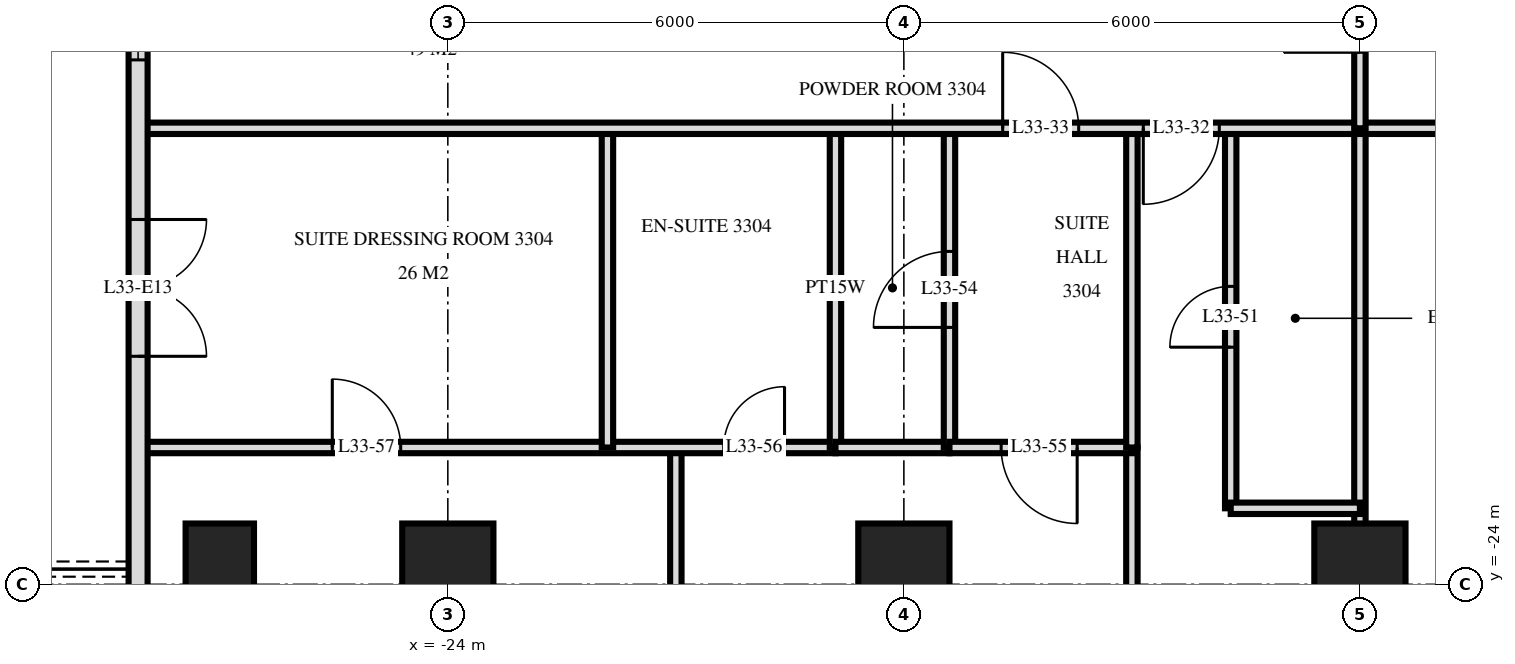
"""IFC4 building model, lengths in metres.
Left out: names, types, materials, properties, quantities, classifications, styles, units other than length and angle.
Written with IfcOpenShell. Run it as: python <this file> out.ifc"""

import sys

from ifc_helpers import new_model, si_unit, direction, frame, frame_2d, origin, origin_2d, place, context, subcontext, project, spatial, rectangle, extrude, element, fill, save


model = new_model("IFC4")
c1 = context("Model", 3, precision=1e-05, world=origin(), true_north=direction((0.0, 1.0)))
c2 = subcontext(c1, "Body", "Model", "MODEL_VIEW")
j1 = project(units=[si_unit("LENGTHUNIT", "METRE"), si_unit("PLANEANGLEUNIT", "RADIAN")], contexts=[c1])
p1 = place(None, origin())
s1 = spatial("IfcSite", under=j1, at=p1, CompositionType="ELEMENT")
p2 = place(p1, origin())
s2 = spatial("IfcBuilding", under=s1, at=p2, CompositionType="ELEMENT")
p3 = place(p2, frame((0.0, 0.0, 130.8)))
s3 = spatial("IfcBuildingStorey", under=s2, at=p3, CompositionType="ELEMENT", Elevation=130.8)
p4 = place(p3, frame((-27.0, -23.8, 0.0), z_axis=(0.0, 0.0, 1.0), x_axis=(0.0, 1.0, 0.0)))
e1 = element("IfcColumn", 1, at=p4, inside=s3, PredefinedType="COLUMN", context=c2, shape_type="SweptSolid", body=[
    extrude(rectangle(XDim=1.2, YDim=0.9, at=origin_2d()), origin(), (0.0, 0.0, 1.0), 3.6),
])
for number, where, z_axis, x_axis in (
    (2, (-24.0, -23.8, 0.0), (0.0, 0.0, 1.0), (1.0, 0.0, 0.0)),
    (3, (-18.0, -23.8, 0.0), (0.0, 0.0, 1.0), (1.0, 0.0, 0.0)),
    (4, (-12.0, -23.8, 0.0), (0.0, 0.0, 1.0), (1.0, 0.0, 0.0)),
):
    element("IfcColumn", number, at=place(p3, frame(where, z_axis=z_axis, x_axis=x_axis)), inside=s3, PredefinedType="COLUMN", context=c2, shape_type="SweptSolid", body=[
        extrude(rectangle(XDim=1.2, YDim=1.2, at=origin_2d()), origin(), (0.0, 0.0, 1.0), 3.6),
    ])
p5 = place(p3, frame((-28.075, -3.325, 0.0), z_axis=(0.0, 0.0, 1.0), x_axis=(0.0, -1.0, 0.0)))
e5 = element("IfcWall", 5, at=p5, inside=s3, PredefinedType="SOLIDWALL", context=c2, shape_type="SweptSolid", body=[
    extrude(rectangle(XDim=25.951, YDim=0.25, at=frame_2d((12.975, 0.0))), origin(), (0.0, 0.0, 1.0), 3.32),
])
p6 = place(p5, frame((6.575, 0.0, 0.0)))
e6 = element("IfcOpeningElement", 6, at=p6, cuts=e5, PredefinedType="OPENING", context=c2, shape_type="SweptSolid", body=[
    extrude(rectangle(XDim=1.8, YDim=2.4, at=frame_2d((0.9, 1.2))), frame((0.0, 0.135, 0.0), z_axis=(0.0, -1.0, 0.0), x_axis=(1.0, 0.0, 0.0)), (0.0, 0.0, 1.0), 0.27),
])
p7 = place(p5, frame((9.425, 0.0, 0.3)))
e7 = element("IfcOpeningElement", 7, at=p7, cuts=e5, PredefinedType="OPENING", context=c2, shape_type="SweptSolid", body=[
    extrude(rectangle(XDim=1.8, YDim=2.1, at=frame_2d((0.9, 1.05))), frame((0.0, 0.135, 0.0), z_axis=(0.0, -1.0, 0.0), x_axis=(1.0, 0.0, 0.0)), (0.0, 0.0, 1.0), 0.27),
])
p8 = place(p5, frame((12.575, 0.0, 0.3)))
e8 = element("IfcOpeningElement", 8, at=p8, cuts=e5, PredefinedType="OPENING", context=c2, shape_type="SweptSolid", body=[
    extrude(rectangle(XDim=1.2, YDim=2.1, at=frame_2d((0.6, 1.05))), frame((0.0, 0.135, 0.0), z_axis=(0.0, -1.0, 0.0), x_axis=(1.0, 0.0, 0.0)), (0.0, 0.0, 1.0), 0.27),
])
p9 = place(p5, frame((15.875, 0.0, 0.0)))
e9 = element("IfcOpeningElement", 9, at=p9, cuts=e5, PredefinedType="OPENING", context=c2, shape_type="SweptSolid", body=[
    extrude(rectangle(XDim=1.8, YDim=2.4, at=frame_2d((0.9, 1.2))), frame((0.0, 0.135, 0.0), z_axis=(0.0, -1.0, 0.0), x_axis=(1.0, 0.0, 0.0)), (0.0, 0.0, 1.0), 0.27),
])
p10 = place(p5, frame((21.075, 0.0, 0.0)))
e10 = element("IfcOpeningElement", 10, at=p10, cuts=e5, PredefinedType="OPENING", context=c2, shape_type="SweptSolid", body=[
    extrude(rectangle(XDim=1.8, YDim=2.4, at=frame_2d((0.9, 1.2))), frame((0.0, 0.135, 0.0), z_axis=(0.0, -1.0, 0.0), x_axis=(1.0, 0.0, 0.0)), (0.0, 0.0, 1.0), 0.27),
])
p11 = place(p5, frame((23.825, 0.0, 0.3)))
e11 = element("IfcOpeningElement", 11, at=p11, cuts=e5, PredefinedType="OPENING", context=c2, shape_type="SweptSolid", body=[
    extrude(rectangle(XDim=1.8, YDim=2.1, at=frame_2d((0.9, 1.05))), frame((0.0, 0.135, 0.0), z_axis=(0.0, -1.0, 0.0), x_axis=(1.0, 0.0, 0.0)), (0.0, 0.0, 1.0), 0.27),
])
p12 = place(p3, frame((-12.0, -18.0, 0.0), z_axis=(0.0, 0.0, 1.0), x_axis=(0.0, 1.0, 0.0)))
e12 = element("IfcWall", 12, at=p12, inside=s3, PredefinedType="PARTITIONING", context=c2, shape_type="SweptSolid", body=[
    extrude(rectangle(XDim=2.95, YDim=0.15, at=frame_2d((1.475, 0.0))), origin(), (0.0, 0.0, 1.0), 3.32),
])
p13 = place(p12, frame((1.0, 0.0, 0.0)))
e13 = element("IfcOpeningElement", 13, at=p13, cuts=e12, PredefinedType="OPENING", context=c2, shape_type="SweptSolid", body=[
    extrude(rectangle(XDim=1.0, YDim=2.1, at=frame_2d((0.5, 1.05))), frame((0.0, 0.085, 0.0), z_axis=(0.0, -1.0, 0.0), x_axis=(1.0, 0.0, 0.0)), (0.0, 0.0, 1.0), 0.17),
])
p14 = place(p3, frame((-12.0, -33.62, 0.0), z_axis=(0.0, 0.0, 1.0), x_axis=(0.0, 1.0, 0.0)))
e14 = element("IfcWall", 14, at=p14, inside=s3, PredefinedType="PARTITIONING", context=c2, shape_type="SweptSolid", body=[
    extrude(rectangle(XDim=15.62, YDim=0.15, at=frame_2d((7.81, 0.0))), origin(), (0.0, 0.0, 1.0), 3.32),
])
p15 = place(p3, frame((-13.7, -23.0, 0.0), z_axis=(0.0, 0.0, 1.0), x_axis=(0.0, 1.0, 0.0)))
e15 = element("IfcWall", 15, at=p15, inside=s3, PredefinedType="PARTITIONING", context=c2, shape_type="SweptSolid", body=[
    extrude(rectangle(XDim=5.0, YDim=0.15, at=frame_2d((2.5, 0.0))), origin(), (0.0, 0.0, 1.0), 3.32),
])
p16 = place(p15, frame((2.12, 0.0, 0.0)))
e16 = element("IfcOpeningElement", 16, at=p16, cuts=e15, PredefinedType="OPENING", context=c2, shape_type="SweptSolid", body=[
    extrude(rectangle(XDim=0.8, YDim=2.1, at=frame_2d((0.4, 1.05))), frame((0.0, 0.085, 0.0), z_axis=(0.0, -1.0, 0.0), x_axis=(1.0, 0.0, 0.0)), (0.0, 0.0, 1.0), 0.17),
])
p17 = place(p3, frame((-15.0, -22.2, 0.0), z_axis=(0.0, 0.0, 1.0), x_axis=(0.0, 1.0, 0.0)))
e17 = element("IfcWall", 17, at=p17, inside=s3, PredefinedType="PARTITIONING", context=c2, shape_type="SweptSolid", body=[
    extrude(rectangle(XDim=4.2, YDim=0.15, at=frame_2d((2.1, 0.0))), origin(), (0.0, 0.0, 1.0), 3.32),
])
p18 = place(p3, frame((-15.0, -33.62, 0.0), z_axis=(0.0, 0.0, 1.0), x_axis=(0.0, 1.0, 0.0)))
e18 = element("IfcWall", 18, at=p18, inside=s3, PredefinedType="PARTITIONING", context=c2, shape_type="SweptSolid", body=[
    extrude(rectangle(XDim=11.42, YDim=0.15, at=frame_2d((5.71, 0.0))), origin(), (0.0, 0.0, 1.0), 3.32),
])
p19 = place(p3, frame((-17.4, -22.2, 0.0), z_axis=(0.0, 0.0, 1.0), x_axis=(0.0, 1.0, 0.0)))
e19 = element("IfcWall", 19, at=p19, inside=s3, PredefinedType="PARTITIONING", context=c2, shape_type="SweptSolid", body=[
    extrude(rectangle(XDim=4.2, YDim=0.15, at=frame_2d((2.1, 0.0))), origin(), (0.0, 0.0, 1.0), 3.32),
])
p20 = place(p19, frame((1.58, 0.0, 0.0)))
e20 = element("IfcOpeningElement", 20, at=p20, cuts=e19, PredefinedType="OPENING", context=c2, shape_type="SweptSolid", body=[
    extrude(rectangle(XDim=1.0, YDim=2.1, at=frame_2d((0.5, 1.05))), frame((0.0, 0.085, 0.0), z_axis=(0.0, -1.0, 0.0), x_axis=(1.0, 0.0, 0.0)), (0.0, 0.0, 1.0), 0.17),
])
p21 = place(p3, frame((-18.9, -22.2, 0.0), z_axis=(0.0, 0.0, 1.0), x_axis=(0.0, 1.0, 0.0)))
e21 = element("IfcWall", 21, at=p21, inside=s3, PredefinedType="PLUMBINGWALL", context=c2, shape_type="SweptSolid", body=[
    extrude(rectangle(XDim=4.2, YDim=0.15, at=frame_2d((2.1, 0.0))), origin(), (0.0, 0.0, 1.0), 3.32),
])
p22 = place(p3, frame((-21.0, -33.62, 0.0), z_axis=(0.0, 0.0, 1.0), x_axis=(0.0, 1.0, 0.0)))
e22 = element("IfcWall", 22, at=p22, inside=s3, PredefinedType="PARTITIONING", context=c2, shape_type="SweptSolid", body=[
    extrude(rectangle(XDim=11.42, YDim=0.15, at=frame_2d((5.71, 0.0))), origin(), (0.0, 0.0, 1.0), 3.32),
])
p23 = place(p22, frame((5.17, 0.0, 0.0)))
e23 = element("IfcOpeningElement", 23, at=p23, cuts=e22, PredefinedType="OPENING", context=c2, shape_type="SweptSolid", body=[
    extrude(rectangle(XDim=0.9, YDim=2.1, at=frame_2d((0.45, 1.05))), frame((0.0, 0.085, 0.0), z_axis=(0.0, -1.0, 0.0), x_axis=(1.0, 0.0, 0.0)), (0.0, 0.0, 1.0), 0.17),
])
p24 = place(p3, frame((-21.9, -22.2, 0.0), z_axis=(0.0, 0.0, 1.0), x_axis=(0.0, 1.0, 0.0)))
e24 = element("IfcWall", 24, at=p24, inside=s3, PredefinedType="PARTITIONING", context=c2, shape_type="SweptSolid", body=[
    extrude(rectangle(XDim=4.2, YDim=0.15, at=frame_2d((2.1, 0.0))), origin(), (0.0, 0.0, 1.0), 3.32),
])
p25 = place(p3, frame((-13.7, -23.0, 0.0), z_axis=(0.0, 0.0, 1.0), x_axis=(1.0, 0.0, 0.0)))
e25 = element("IfcWall", 25, at=p25, inside=s3, PredefinedType="PARTITIONING", context=c2, shape_type="SweptSolid", body=[
    extrude(rectangle(XDim=1.7, YDim=0.15, at=frame_2d((0.85, 0.0))), origin(), (0.0, 0.0, 1.0), 3.32),
])
p26 = place(p3, frame((-17.4, -22.2, 0.0), z_axis=(0.0, 0.0, 1.0), x_axis=(1.0, 0.0, 0.0)))
e26 = element("IfcWall", 26, at=p26, inside=s3, PredefinedType="PARTITIONING", context=c2, shape_type="SweptSolid", body=[
    extrude(rectangle(XDim=2.4, YDim=0.15, at=frame_2d((1.2, 0.0))), origin(), (0.0, 0.0, 1.0), 3.32),
])
p27 = place(p26, frame((0.68, 0.0, 0.0)))
e27 = element("IfcOpeningElement", 27, at=p27, cuts=e26, PredefinedType="OPENING", context=c2, shape_type="SweptSolid", body=[
    extrude(rectangle(XDim=1.0, YDim=2.1, at=frame_2d((0.5, 1.05))), frame((0.0, 0.085, 0.0), z_axis=(0.0, -1.0, 0.0), x_axis=(1.0, 0.0, 0.0)), (0.0, 0.0, 1.0), 0.17),
])
p28 = place(p3, frame((-28.02, -22.2, 0.0), z_axis=(0.0, 0.0, 1.0), x_axis=(1.0, 0.0, 0.0)))
e28 = element("IfcWall", 28, at=p28, inside=s3, PredefinedType="PARTITIONING", context=c2, shape_type="SweptSolid", body=[
    extrude(rectangle(XDim=9.12, YDim=0.15, at=frame_2d((4.56, 0.0))), origin(), (0.0, 0.0, 1.0), 3.32),
])
p29 = place(p28, frame((7.65, 0.0, 0.0)))
e29 = element("IfcOpeningElement", 29, at=p29, cuts=e28, PredefinedType="OPENING", context=c2, shape_type="SweptSolid", body=[
    extrude(rectangle(XDim=0.8, YDim=2.1, at=frame_2d((0.4, 1.05))), frame((0.0, 0.085, 0.0), z_axis=(0.0, -1.0, 0.0), x_axis=(1.0, 0.0, 0.0)), (0.0, 0.0, 1.0), 0.17),
])
p30 = place(p28, frame((2.5, 0.0, 0.0)))
e30 = element("IfcOpeningElement", 30, at=p30, cuts=e28, PredefinedType="OPENING", context=c2, shape_type="SweptSolid", body=[
    extrude(rectangle(XDim=0.9, YDim=2.1, at=frame_2d((0.45, 1.05))), frame((0.0, 0.085, 0.0), z_axis=(0.0, -1.0, 0.0), x_axis=(1.0, 0.0, 0.0)), (0.0, 0.0, 1.0), 0.17),
])
p31 = place(p3, frame((-18.9, -22.2, 0.0), z_axis=(0.0, 0.0, 1.0), x_axis=(1.0, 0.0, 0.0)))
e31 = element("IfcWall", 31, at=p31, inside=s3, PredefinedType="PLUMBINGWALL", context=c2, shape_type="SweptSolid", body=[
    extrude(rectangle(XDim=1.5, YDim=0.15, at=frame_2d((0.75, 0.0))), origin(), (0.0, 0.0, 1.0), 3.32),
])
p32 = place(p3, frame((-28.02, -18.0, 0.0), z_axis=(0.0, 0.0, 1.0), x_axis=(1.0, 0.0, 0.0)))
e32 = element("IfcWall", 32, at=p32, inside=s3, PredefinedType="PARTITIONING", context=c2, shape_type="SweptSolid", body=[
    extrude(rectangle(XDim=56.04, YDim=0.15, at=frame_2d((28.02, 0.0))), origin(), (0.0, 0.0, 1.0), 3.32),
])
p33 = place(p32, frame((13.17, 0.0, 0.0)))
e33 = element("IfcOpeningElement", 33, at=p33, cuts=e32, PredefinedType="OPENING", context=c2, shape_type="SweptSolid", body=[
    extrude(rectangle(XDim=1.0, YDim=2.1, at=frame_2d((0.5, 1.05))), frame((0.0, 0.085, 0.0), z_axis=(0.0, -1.0, 0.0), x_axis=(1.0, 0.0, 0.0)), (0.0, 0.0, 1.0), 0.17),
])
p34 = place(p32, frame((11.32, 0.0, 0.0)))
e34 = element("IfcOpeningElement", 34, at=p34, cuts=e32, PredefinedType="OPENING", context=c2, shape_type="SweptSolid", body=[
    extrude(rectangle(XDim=1.0, YDim=2.1, at=frame_2d((0.5, 1.05))), frame((0.0, 0.085, 0.0), z_axis=(0.0, -1.0, 0.0), x_axis=(1.0, 0.0, 0.0)), (0.0, 0.0, 1.0), 0.17),
])
p35 = place(p32, frame((41.87, 0.0, 0.0)))
e35 = element("IfcOpeningElement", 35, at=p35, cuts=e32, PredefinedType="OPENING", context=c2, shape_type="SweptSolid", body=[
    extrude(rectangle(XDim=1.0, YDim=2.1, at=frame_2d((0.5, 1.05))), frame((0.0, 0.085, 0.0), z_axis=(0.0, -1.0, 0.0), x_axis=(1.0, 0.0, 0.0)), (0.0, 0.0, 1.0), 0.17),
])
p36 = place(p32, frame((43.17, 0.0, 0.0)))
e36 = element("IfcOpeningElement", 36, at=p36, cuts=e32, PredefinedType="OPENING", context=c2, shape_type="SweptSolid", body=[
    extrude(rectangle(XDim=1.0, YDim=2.1, at=frame_2d((0.5, 1.05))), frame((0.0, 0.085, 0.0), z_axis=(0.0, -1.0, 0.0), x_axis=(1.0, 0.0, 0.0)), (0.0, 0.0, 1.0), 0.17),
])
p37 = place(p32, frame((46.72, 0.0, 0.0)))
e37 = element("IfcOpeningElement", 37, at=p37, cuts=e32, PredefinedType="OPENING", context=c2, shape_type="SweptSolid", body=[
    extrude(rectangle(XDim=1.0, YDim=2.1, at=frame_2d((0.5, 1.05))), frame((0.0, 0.085, 0.0), z_axis=(0.0, -1.0, 0.0), x_axis=(1.0, 0.0, 0.0)), (0.0, 0.0, 1.0), 0.17),
])
p38 = place(p32, frame((21.52, 0.0, 0.0)))
e38 = element("IfcOpeningElement", 38, at=p38, cuts=e32, PredefinedType="OPENING", context=c2, shape_type="SweptSolid", body=[
    extrude(rectangle(XDim=1.0, YDim=2.1, at=frame_2d((0.5, 1.05))), frame((0.0, 0.085, 0.0), z_axis=(0.0, -1.0, 0.0), x_axis=(1.0, 0.0, 0.0)), (0.0, 0.0, 1.0), 0.17),
])
p39 = place(p32, frame((33.52, 0.0, 0.0)))
e39 = element("IfcOpeningElement", 39, at=p39, cuts=e32, PredefinedType="OPENING", context=c2, shape_type="SweptSolid", body=[
    extrude(rectangle(XDim=1.0, YDim=2.1, at=frame_2d((0.5, 1.05))), frame((0.0, 0.085, 0.0), z_axis=(0.0, -1.0, 0.0), x_axis=(1.0, 0.0, 0.0)), (0.0, 0.0, 1.0), 0.17),
])
p40 = place(p8, origin())
e40 = element("IfcWindow", 40, at=p40, inside=s3, PartitioningType="SINGLE_PANEL", PredefinedType="WINDOW", context=c2, shape_type="SweptSolid", body=[
    extrude(rectangle(XDim=1.2, YDim=2.1, at=frame_2d((0.6, 1.05))), frame((0.0, 0.03, 0.0), z_axis=(0.0, -1.0, 0.0), x_axis=(1.0, 0.0, 0.0)), (0.0, 0.0, 1.0), 0.06),
])
fill(e8, e40)
p41 = place(p9, origin())
e41 = element("IfcDoor", 41, at=p41, inside=s3, OperationType="DOUBLE_DOOR_SINGLE_SWING", PredefinedType="DOOR", context=c2, shape_type="SweptSolid", body=[
    extrude(rectangle(XDim=1.8, YDim=2.4, at=frame_2d((0.9, 1.2))), frame((0.0, 0.025, 0.0), z_axis=(0.0, -1.0, 0.0), x_axis=(1.0, 0.0, 0.0)), (0.0, 0.0, 1.0), 0.05),
])
fill(e9, e41)
p42 = place(p33, frame((0.5, 0.0, 0.0), z_axis=(0.0, 0.0, 1.0), x_axis=(-1.0, 0.0, 0.0)))
e42 = element("IfcDoor", 42, at=p42, inside=s3, OperationType="SINGLE_SWING_LEFT", PredefinedType="DOOR", context=c2, shape_type="SweptSolid", body=[
    extrude(rectangle(XDim=1.0, YDim=2.1, at=frame_2d((0.0, 1.05))), frame((0.0, -0.025, 0.0), z_axis=(0.0, 1.0, 0.0), x_axis=(-1.0, 0.0, 0.0)), (0.0, 0.0, 1.0), 0.05),
])
fill(e33, e42)
p43 = place(p34, origin())
e43 = element("IfcDoor", 43, at=p43, inside=s3, OperationType="SINGLE_SWING_RIGHT", PredefinedType="DOOR", context=c2, shape_type="SweptSolid", body=[
    extrude(rectangle(XDim=1.0, YDim=2.1, at=frame_2d((0.5, 1.05))), frame((0.0, 0.025, 0.0), z_axis=(0.0, -1.0, 0.0), x_axis=(1.0, 0.0, 0.0)), (0.0, 0.0, 1.0), 0.05),
])
fill(e34, e43)
p44 = place(p16, origin())
e44 = element("IfcDoor", 44, at=p44, inside=s3, OperationType="SINGLE_SWING_RIGHT", PredefinedType="DOOR", context=c2, shape_type="SweptSolid", body=[
    extrude(rectangle(XDim=0.8, YDim=2.1, at=frame_2d((0.4, 1.05))), frame((0.0, 0.025, 0.0), z_axis=(0.0, -1.0, 0.0), x_axis=(1.0, 0.0, 0.0)), (0.0, 0.0, 1.0), 0.05),
])
fill(e16, e44)
p45 = place(p20, origin())
e45 = element("IfcDoor", 45, at=p45, inside=s3, OperationType="SINGLE_SWING_RIGHT", PredefinedType="DOOR", context=c2, shape_type="SweptSolid", body=[
    extrude(rectangle(XDim=1.0, YDim=2.1, at=frame_2d((0.5, 1.05))), frame((0.0, 0.025, 0.0), z_axis=(0.0, -1.0, 0.0), x_axis=(1.0, 0.0, 0.0)), (0.0, 0.0, 1.0), 0.05),
])
fill(e20, e45)
p46 = place(p27, frame((0.5, 0.0, 0.0), z_axis=(0.0, 0.0, 1.0), x_axis=(-1.0, 0.0, 0.0)))
e46 = element("IfcDoor", 46, at=p46, inside=s3, OperationType="SINGLE_SWING_RIGHT", PredefinedType="DOOR", context=c2, shape_type="SweptSolid", body=[
    extrude(rectangle(XDim=1.0, YDim=2.1, at=frame_2d((0.0, 1.05))), frame((0.0, -0.025, 0.0), z_axis=(0.0, 1.0, 0.0), x_axis=(-1.0, 0.0, 0.0)), (0.0, 0.0, 1.0), 0.05),
])
fill(e27, e46)
p47 = place(p29, origin())
e47 = element("IfcDoor", 47, at=p47, inside=s3, OperationType="SINGLE_SWING_LEFT", PredefinedType="DOOR", context=c2, shape_type="SweptSolid", body=[
    extrude(rectangle(XDim=0.8, YDim=2.1, at=frame_2d((0.4, 1.05))), frame((0.0, 0.025, 0.0), z_axis=(0.0, -1.0, 0.0), x_axis=(1.0, 0.0, 0.0)), (0.0, 0.0, 1.0), 0.05),
])
fill(e29, e47)
p48 = place(p30, origin())
e48 = element("IfcDoor", 48, at=p48, inside=s3, OperationType="SINGLE_SWING_RIGHT", PredefinedType="DOOR", context=c2, shape_type="SweptSolid", body=[
    extrude(rectangle(XDim=0.9, YDim=2.1, at=frame_2d((0.45, 1.05))), frame((0.0, 0.025, 0.0), z_axis=(0.0, -1.0, 0.0), x_axis=(1.0, 0.0, 0.0)), (0.0, 0.0, 1.0), 0.05),
])
fill(e30, e48)
save(model, sys.argv[1])
